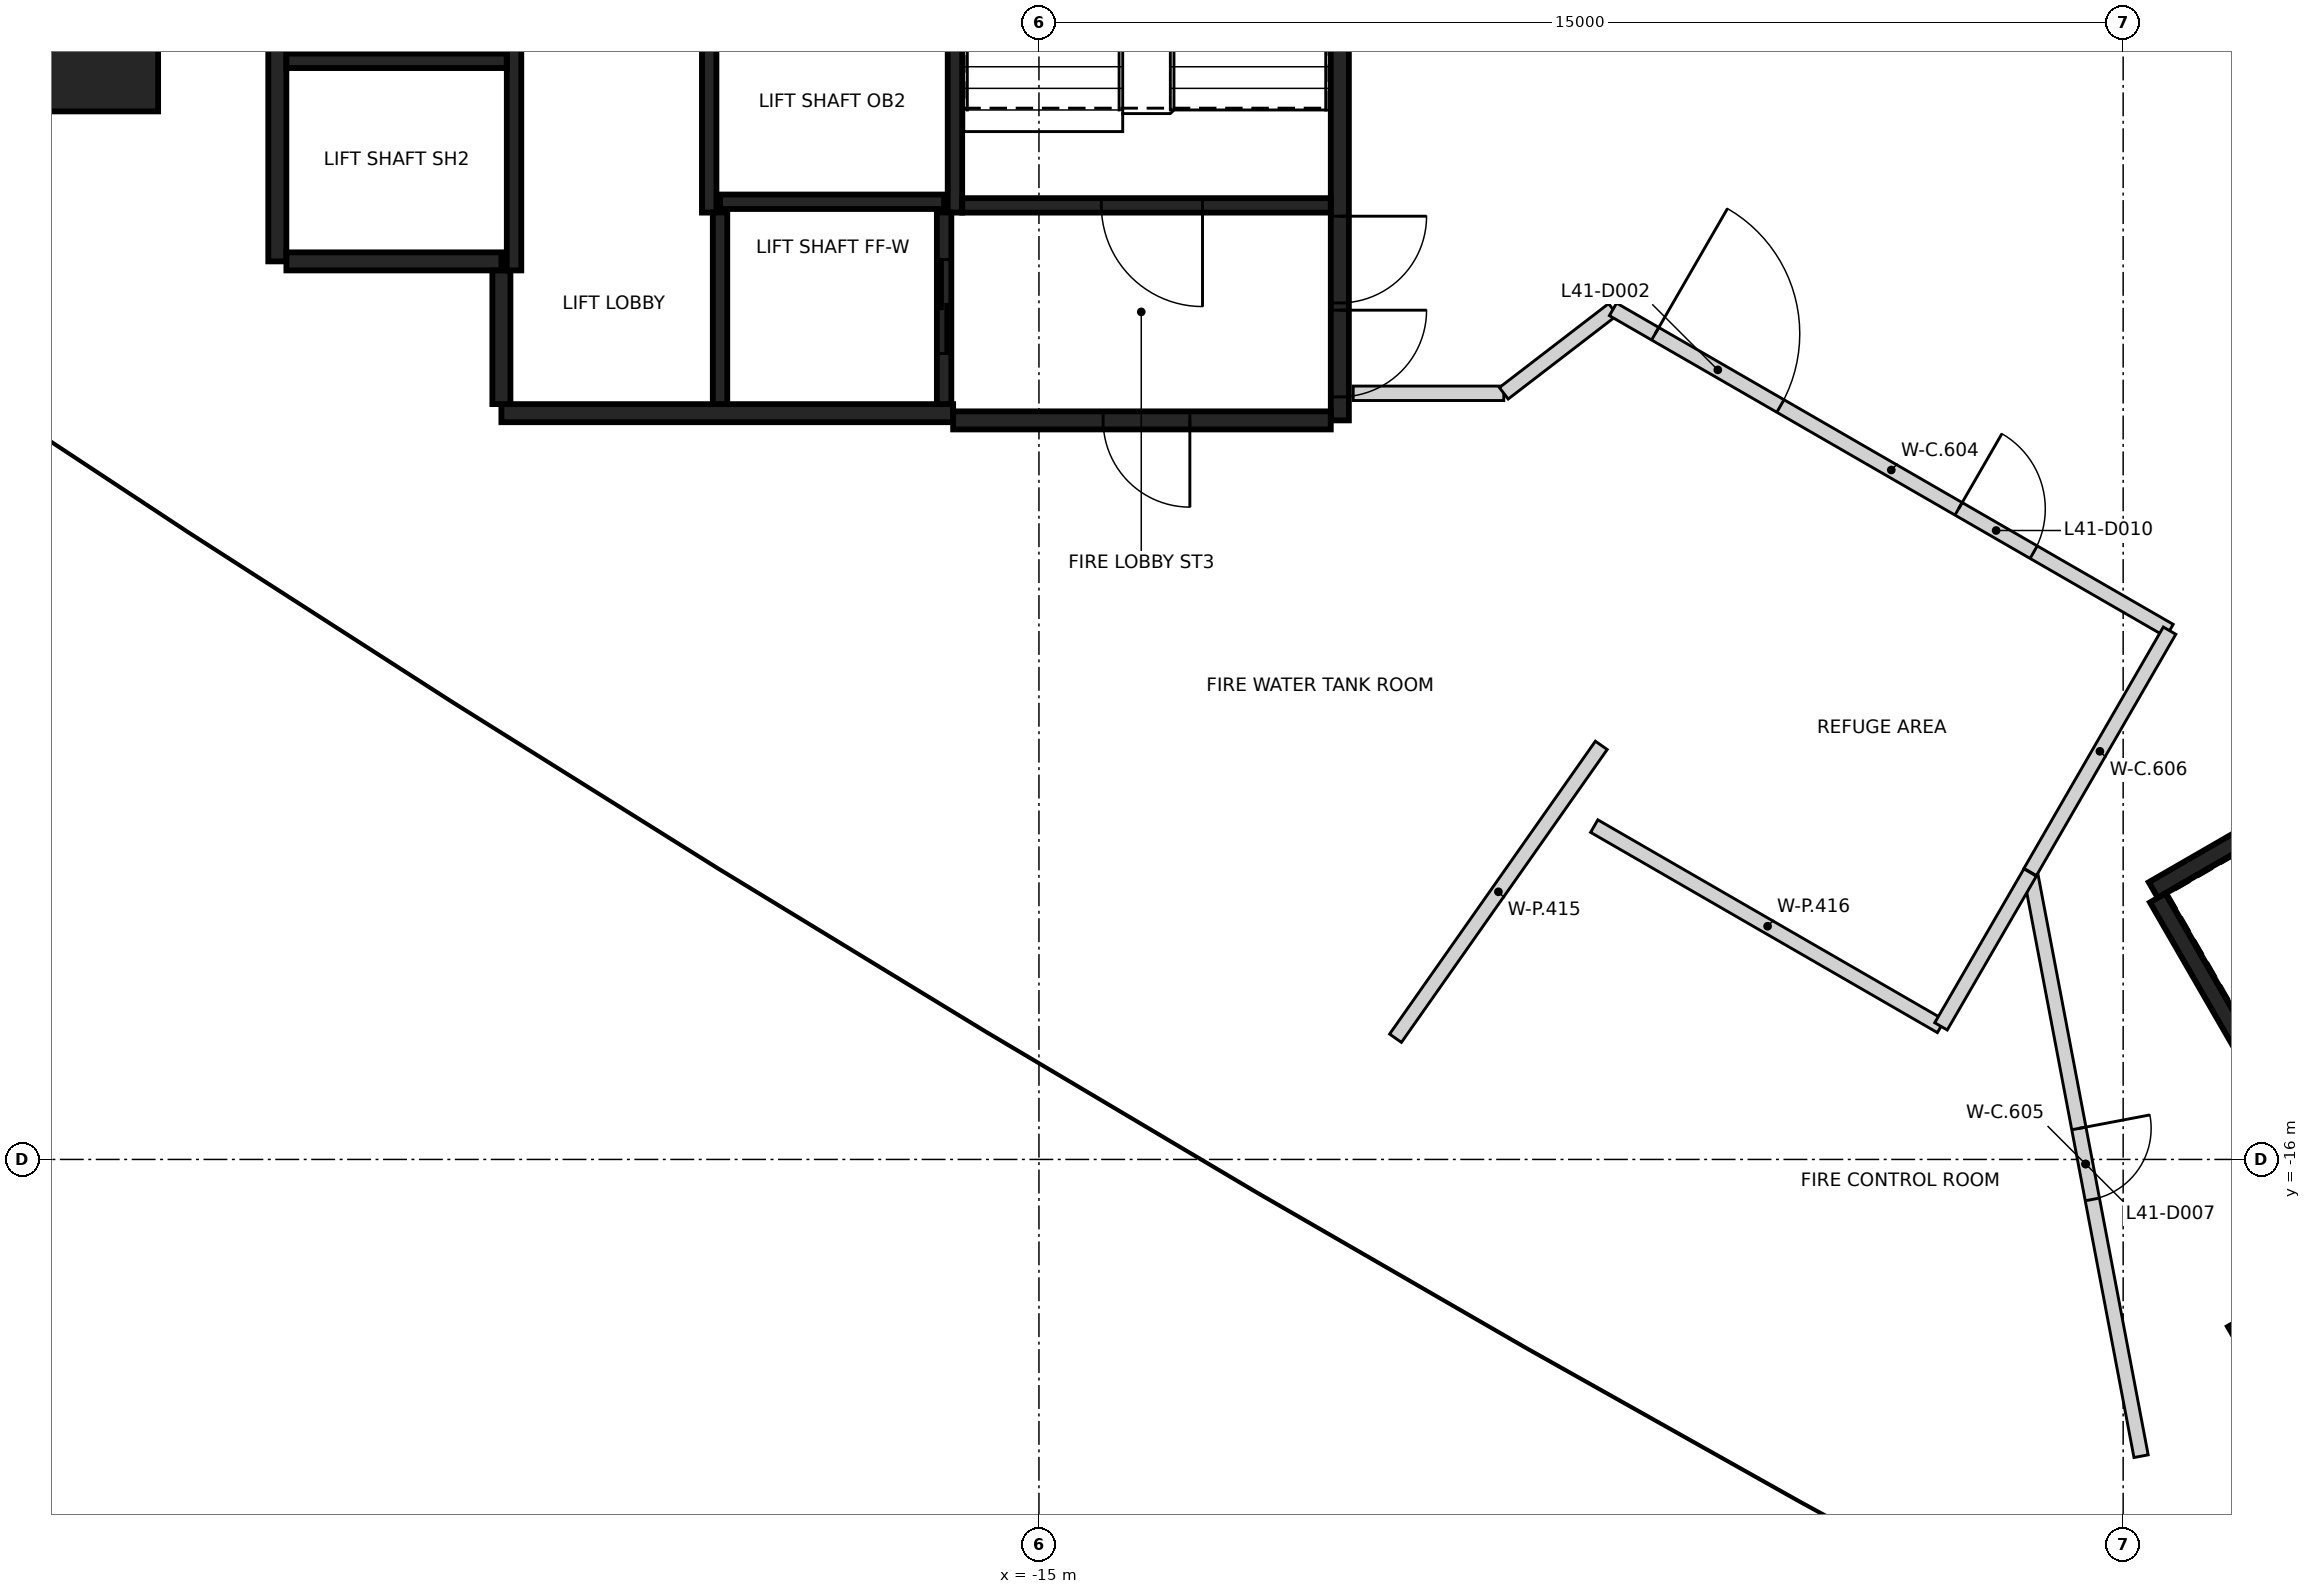
"""IFC4 building model, lengths in metres.
Left out: names, types, materials, properties, quantities, classifications, styles, units other than length and angle.
Written with IfcOpenShell. Run it as: python <this file> out.ifc"""

import sys

from ifc_helpers import new_model, si_unit, direction, frame, frame_2d, origin, origin_2d, place, context, subcontext, project, spatial, rectangle, extrude, element, fill, save


model = new_model("IFC4")
c1 = context("Model", 3, precision=1e-05, world=origin(), true_north=direction((0.0, 1.0)))
c2 = subcontext(c1, "Body", "Model", "MODEL_VIEW")
j1 = project(units=[si_unit("LENGTHUNIT", "METRE"), si_unit("PLANEANGLEUNIT", "RADIAN")], contexts=[c1])
p1 = place(None, origin())
s1 = spatial("IfcSite", under=j1, at=p1, CompositionType="ELEMENT")
p2 = place(p1, origin())
s2 = spatial("IfcBuilding", under=s1, at=p2, CompositionType="ELEMENT")
p3 = place(p2, frame((0.0, 0.0, 164.8)))
s3 = spatial("IfcBuildingStorey", under=s2, at=p3, CompositionType="ELEMENT", Elevation=164.8)
p4 = place(p3, frame((-28.987, 0.0, -0.4), z_axis=(0.0, 0.0, 1.0), x_axis=(1.0, 0.0, 0.0)))
e1 = element("IfcColumn", 1, at=p4, inside=s3, PredefinedType="COLUMN", context=c2, shape_type="SweptSolid", body=[
    extrude(rectangle(XDim=3.6, YDim=3.0, at=origin_2d()), origin(), (0.0, 0.0, 1.0), 4.85),
])
p5 = place(p3, frame((-10.837, 5.775, 0.0), z_axis=(0.0, 0.0, 1.0), x_axis=(0.0, -1.0, 0.0)))
e2 = element("IfcWall", 2, at=p5, inside=s3, PredefinedType="SHEAR", context=c2, shape_type="SweptSolid", body=[
    extrude(rectangle(XDim=11.55, YDim=0.25, at=frame_2d((5.775, 0.0))), origin(), (0.0, 0.0, 1.0), 4.45),
])
p6 = place(p5, frame((10.025, 0.0, 0.0)))
e3 = element("IfcOpeningElement", 3, at=p6, cuts=e2, PredefinedType="OPENING", context=c2, shape_type="SweptSolid", body=[
    extrude(rectangle(XDim=1.2, YDim=2.1, at=frame_2d((0.6, 1.05))), frame((0.0, 0.135, 0.0), z_axis=(0.0, -1.0, 0.0), x_axis=(1.0, 0.0, 0.0)), (0.0, 0.0, 1.0), 0.27),
])
p7 = place(p5, frame((8.725, 0.0, 0.0)))
e4 = element("IfcOpeningElement", 4, at=p7, cuts=e2, PredefinedType="OPENING", context=c2, shape_type="SweptSolid", body=[
    extrude(rectangle(XDim=1.2, YDim=2.1, at=frame_2d((0.6, 1.05))), frame((0.0, 0.135, 0.0), z_axis=(0.0, -1.0, 0.0), x_axis=(1.0, 0.0, 0.0)), (0.0, 0.0, 1.0), 0.27),
])
p8 = place(p3, frame((-16.187, -5.675, 0.0), z_axis=(0.0, 0.0, 1.0), x_axis=(-1.0, 0.0, 0.0)))
e5 = element("IfcWall", 5, at=p8, inside=s3, PredefinedType="SHEAR", context=c2, shape_type="SweptSolid", body=[
    extrude(rectangle(XDim=6.25, YDim=0.25, at=frame_2d((3.125, 0.0))), origin(), (0.0, 0.0, 1.0), 4.45),
])
p9 = place(p3, frame((-25.537, -3.575, 0.0), z_axis=(0.0, 0.0, 1.0), x_axis=(0.0, 1.0, 0.0)))
e6 = element("IfcWall", 6, at=p9, inside=s3, PredefinedType="SHEAR", context=c2, shape_type="SweptSolid", body=[
    extrude(rectangle(XDim=5.85, YDim=0.25, at=frame_2d((2.925, 0.0))), origin(), (0.0, 0.0, 1.0), 4.45),
])
p10 = place(p3, frame((-10.963, -5.775, 0.0), z_axis=(0.0, 0.0, 1.0), x_axis=(-1.0, 0.0, 0.0)))
e7 = element("IfcWall", 7, at=p10, inside=s3, PredefinedType="SHEAR", context=c2, shape_type="SweptSolid", body=[
    extrude(rectangle(XDim=5.225, YDim=0.25, at=frame_2d((2.612, 0.0))), origin(), (0.0, 0.0, 1.0), 4.45),
])
p11 = place(p10, frame((1.95, 0.0, 0.0)))
e8 = element("IfcOpeningElement", 8, at=p11, cuts=e7, PredefinedType="OPENING", context=c2, shape_type="SweptSolid", body=[
    extrude(rectangle(XDim=1.2, YDim=2.1, at=frame_2d((0.6, 1.05))), frame((0.0, 0.135, 0.0), z_axis=(0.0, -1.0, 0.0), x_axis=(1.0, 0.0, 0.0)), (0.0, 0.0, 1.0), 0.27),
])
p12 = place(p3, frame((-22.437, -3.575, 0.0), z_axis=(0.0, 0.0, 1.0), x_axis=(-1.0, 0.0, 0.0)))
e9 = element("IfcWall", 9, at=p12, inside=s3, PredefinedType="SHEAR", context=c2, shape_type="SweptSolid", body=[
    extrude(rectangle(XDim=2.975, YDim=0.25, at=frame_2d((1.487, 0.0))), origin(), (0.0, 0.0, 1.0), 4.45),
])
p13 = place(p3, frame((-22.437, -5.55, 0.0), z_axis=(0.0, 0.0, 1.0), x_axis=(0.0, 1.0, 0.0)))
e10 = element("IfcWall", 10, at=p13, inside=s3, PredefinedType="SHEAR", context=c2, shape_type="SweptSolid", body=[
    extrude(rectangle(XDim=1.849, YDim=0.25, at=frame_2d((0.925, 0.0))), origin(), (0.0, 0.0, 1.0), 4.45),
])
p14 = place(p3, frame((-16.162, 2.951, 0.0), z_axis=(0.0, 0.0, 1.0), x_axis=(0.0, -1.0, 0.0)))
e11 = element("IfcWall", 11, at=p14, inside=s3, PredefinedType="SHEAR", context=c2, shape_type="SweptSolid", body=[
    extrude(rectangle(XDim=5.851, YDim=0.2, at=frame_2d((2.925, 0.0))), origin(), (0.0, 0.0, 1.0), 4.45),
])
for number, where, z_axis, x_axis in (
    (12, (-19.562, -2.9, 0.0), (0.0, 0.0, 1.0), (0.0, 1.0, 0.0)),
    (13, (-22.262, 2.4, 0.0), (0.0, 0.0, 1.0), (0.0, -1.0, 0.0)),
):
    element("IfcWall", number, at=place(p3, frame(where, z_axis=z_axis, x_axis=x_axis)), inside=s3, PredefinedType="SHEAR", context=c2, shape_type="SweptSolid", body=[
        extrude(rectangle(XDim=6.1, YDim=0.2, at=frame_2d((3.05, 0.0))), origin(), (0.0, 0.0, 1.0), 4.45),
    ])
p15 = place(p3, frame((-10.963, -2.8, 0.0), z_axis=(0.0, 0.0, 1.0), x_axis=(-1.0, 0.0, 0.0)))
e14 = element("IfcWall", 14, at=p15, inside=s3, PredefinedType="SHEAR", context=c2, shape_type="SweptSolid", body=[
    extrude(rectangle(XDim=5.098, YDim=0.2, at=frame_2d((2.549, 0.0))), origin(), (0.0, 0.0, 1.0), 4.45),
])
p16 = place(p15, frame((1.774, 0.0, 0.0)))
e15 = element("IfcOpeningElement", 15, at=p16, cuts=e14, PredefinedType="OPENING", context=c2, shape_type="SweptSolid", body=[
    extrude(rectangle(XDim=1.4, YDim=2.1, at=frame_2d((0.7, 1.05))), frame((0.0, 0.11, 0.0), z_axis=(0.0, -1.0, 0.0), x_axis=(1.0, 0.0, 0.0)), (0.0, 0.0, 1.0), 0.22),
])
p17 = place(p3, frame((-22.363, -0.8, 0.0), z_axis=(0.0, 0.0, 1.0), x_axis=(-1.0, 0.0, 0.0)))
e16 = element("IfcWall", 16, at=p17, inside=s3, PredefinedType="SHEAR", context=c2, shape_type="SweptSolid", body=[
    extrude(rectangle(XDim=3.048, YDim=0.2, at=frame_2d((1.524, 0.0))), origin(), (0.0, 0.0, 1.0), 4.45),
])
p18 = place(p3, frame((-19.412, -2.75, 0.0), z_axis=(0.0, 0.0, 1.0), x_axis=(1.0, 0.0, 0.0)))
e17 = element("IfcWall", 17, at=p18, inside=s3, PredefinedType="SHEAR", context=c2, shape_type="SweptSolid", body=[
    extrude(rectangle(XDim=3.1, YDim=0.2, at=frame_2d((1.55, 0.0))), origin(), (0.0, 0.0, 1.0), 4.45),
])
p19 = place(p3, frame((-16.312, -2.898, 0.0), z_axis=(0.0, 0.0, 1.0), x_axis=(0.0, -1.0, 0.0)))
e18 = element("IfcWall", 18, at=p19, inside=s3, PredefinedType="SHEAR", context=c2, shape_type="SweptSolid", body=[
    extrude(rectangle(XDim=2.651, YDim=0.2, at=frame_2d((1.325, 0.0))), origin(), (0.0, 0.0, 1.0), 4.45),
])
p20 = place(p19, frame((0.652, 0.0, 0.0)))
e19 = element("IfcOpeningElement", 19, at=p20, cuts=e18, PredefinedType="OPENING", context=c2, shape_type="SweptSolid", body=[
    extrude(rectangle(XDim=1.3, YDim=2.1, at=frame_2d((0.65, 1.05))), frame((0.0, 0.11, 0.0), z_axis=(0.0, -1.0, 0.0), x_axis=(1.0, 0.0, 0.0)), (0.0, 0.0, 1.0), 0.22),
])
p21 = place(p3, frame((-19.412, -5.549, 0.0), z_axis=(0.0, 0.0, 1.0), x_axis=(0.0, 1.0, 0.0)))
e20 = element("IfcWall", 20, at=p21, inside=s3, PredefinedType="SHEAR", context=c2, shape_type="SweptSolid", body=[
    extrude(rectangle(XDim=2.651, YDim=0.2, at=frame_2d((1.325, 0.0))), origin(), (0.0, 0.0, 1.0), 4.45),
])
p22 = place(p3, frame((0.417, -12.273, 0.0), z_axis=(0.0, 0.0, 1.0), x_axis=(0.866021906294, 0.500006057782, 0.0)))
e21 = element("IfcWall", 21, at=p22, inside=s3, PredefinedType="SHEAR", context=c2, shape_type="SweptSolid", body=[
    extrude(rectangle(XDim=11.55, YDim=0.25, at=frame_2d((5.775, 0.0))), origin(), (0.0, 0.0, 1.0), 4.45),
])
p23 = place(p22, frame((10.025, 0.0, 0.0)))
e22 = element("IfcOpeningElement", 22, at=p23, cuts=e21, PredefinedType="OPENING", context=c2, shape_type="SweptSolid", body=[
    extrude(rectangle(XDim=1.2, YDim=2.1, at=frame_2d((0.6, 1.05))), frame((0.0, 0.135, 0.0), z_axis=(0.0, -1.0, 0.0), x_axis=(1.0, 0.0, 0.0)), (0.0, 0.0, 1.0), 0.27),
])
p24 = place(p22, frame((8.725, 0.0, 0.0)))
e23 = element("IfcOpeningElement", 23, at=p24, cuts=e21, PredefinedType="OPENING", context=c2, shape_type="SweptSolid", body=[
    extrude(rectangle(XDim=1.2, YDim=2.1, at=frame_2d((0.6, 1.05))), frame((0.0, 0.135, 0.0), z_axis=(0.0, -1.0, 0.0), x_axis=(1.0, 0.0, 0.0)), (0.0, 0.0, 1.0), 0.27),
])
p25 = place(p3, frame((3.235, -17.153, 0.0), z_axis=(0.0, 0.0, 1.0), x_axis=(-0.500008851346, 0.866020293397, 0.0)))
e24 = element("IfcWall", 24, at=p25, inside=s3, PredefinedType="SHEAR", context=c2, shape_type="SweptSolid", body=[
    extrude(rectangle(XDim=5.51, YDim=0.25, at=frame_2d((2.755, 0.0))), origin(), (0.0, 0.0, 1.0), 4.45),
])
p26 = place(p3, frame((3.085, -20.894, 0.0), z_axis=(0.0, 0.0, 1.0), x_axis=(-0.499978833458, 0.866037623948, 0.0)))
e25 = element("IfcWall", 25, at=p26, inside=s3, PredefinedType="SHEAR", context=c2, shape_type="SweptSolid", body=[
    extrude(rectangle(XDim=3.05, YDim=0.25, at=frame_2d((1.525, 0.0))), origin(), (0.0, 0.0, 1.0), 4.45),
])
p27 = place(p3, frame((-10.652, -5.4, 0.0), z_axis=(0.0, 0.0, 1.0), x_axis=(1.0, 0.0, 0.0)))
e26 = element("IfcWall", 26, at=p27, inside=s3, PredefinedType="PARTITIONING", context=c2, shape_type="SweptSolid", body=[
    extrude(rectangle(XDim=2.083, YDim=0.2, at=frame_2d((1.042, 0.0))), origin(), (0.0, 0.0, 1.0), 4.45),
])
p28 = place(p3, frame((-8.569, -5.4, 0.0), z_axis=(0.0, 0.0, 1.0), x_axis=(0.792981085858, 0.609246253555, 0.0)))
e27 = element("IfcWall", 27, at=p28, inside=s3, PredefinedType="PARTITIONING", context=c2, shape_type="SweptSolid", body=[
    extrude(rectangle(XDim=1.906, YDim=0.2, at=frame_2d((0.953, 0.0))), origin(), (0.0, 0.0, 1.0), 4.45),
])
p29 = place(p3, frame((-7.058, -4.239, 0.0), z_axis=(0.0, 0.0, 1.0), x_axis=(0.86609917177, -0.499872208329, 0.0)))
e28 = element("IfcWall", 28, at=p29, inside=s3, PredefinedType="PARTITIONING", context=c2, shape_type="SweptSolid", body=[
    extrude(rectangle(XDim=8.891, YDim=0.2, at=frame_2d((4.445, 0.0))), origin(), (0.0, 0.0, 1.0), 4.45),
])
p30 = place(p29, frame((0.674, 0.0, 0.0)))
e29 = element("IfcOpeningElement", 29, at=p30, cuts=e28, PredefinedType="OPENING", context=c2, shape_type="SweptSolid", body=[
    extrude(rectangle(XDim=2.0, YDim=2.1, at=frame_2d((1.0, 1.05))), frame((0.0, 0.11, 0.0), z_axis=(0.0, -1.0, 0.0), x_axis=(1.0, 0.0, 0.0)), (0.0, 0.0, 1.0), 0.22),
])
p31 = place(p29, frame((5.52, 0.0, 0.0)))
e30 = element("IfcOpeningElement", 30, at=p31, cuts=e28, PredefinedType="OPENING", context=c2, shape_type="SweptSolid", body=[
    extrude(rectangle(XDim=1.2, YDim=2.1, at=frame_2d((0.6, 1.05))), frame((0.0, 0.11, 0.0), z_axis=(0.0, -1.0, 0.0), x_axis=(1.0, 0.0, 0.0)), (0.0, 0.0, 1.0), 0.22),
])
p32 = place(p3, frame((-1.286, -12.023, 0.0), z_axis=(0.0, 0.0, 1.0), x_axis=(0.186445263773, -0.98246534983, 0.0)))
e31 = element("IfcWall", 31, at=p32, inside=s3, PredefinedType="PARTITIONING", context=c2, shape_type="SweptSolid", body=[
    extrude(rectangle(XDim=8.227, YDim=0.2, at=frame_2d((4.114, 0.0))), origin(), (0.0, 0.0, 1.0), 4.45),
])
p33 = place(p32, frame((3.611, 0.0, 0.0)))
e32 = element("IfcOpeningElement", 32, at=p33, cuts=e31, PredefinedType="OPENING", context=c2, shape_type="SweptSolid", body=[
    extrude(rectangle(XDim=1.0, YDim=2.1, at=frame_2d((0.5, 1.05))), frame((0.0, 0.11, 0.0), z_axis=(0.0, -1.0, 0.0), x_axis=(1.0, 0.0, 0.0)), (0.0, 0.0, 1.0), 0.22),
])
p34 = place(p3, frame((-1.286, -12.023, 0.0), z_axis=(0.0, 0.0, 1.0), x_axis=(0.50005498091, 0.865993658214, 0.0)))
e33 = element("IfcWall", 33, at=p34, inside=s3, PredefinedType="PARTITIONING", context=c2, shape_type="SweptSolid", body=[
    extrude(rectangle(XDim=3.855, YDim=0.2, at=frame_2d((1.928, 0.0))), origin(), (0.0, 0.0, 1.0), 4.45),
])
p35 = place(p3, frame((-10.067, -14.323, 0.0), z_axis=(0.0, 0.0, 1.0), x_axis=(0.574887536517, 0.818232436632, 0.0)))
e34 = element("IfcWall", 34, at=p35, inside=s3, PredefinedType="PARTITIONING", context=c2, shape_type="SweptSolid", body=[
    extrude(rectangle(XDim=4.952, YDim=0.2, at=frame_2d((2.476, 0.0))), origin(), (0.0, 0.0, 1.0), 4.45),
])
p36 = place(p3, frame((-7.318, -11.388, 0.0), z_axis=(0.0, 0.0, 1.0), x_axis=(0.865961763079, -0.500110212738, 0.0)))
e35 = element("IfcWall", 35, at=p36, inside=s3, PredefinedType="PARTITIONING", context=c2, shape_type="SweptSolid", body=[
    extrude(rectangle(XDim=5.541, YDim=0.2, at=frame_2d((2.771, 0.0))), origin(), (0.0, 0.0, 1.0), 4.45),
])
p37 = place(p3, frame((-2.52, -14.159, 0.0), z_axis=(0.0, 0.0, 1.0), x_axis=(0.501153622479, 0.865358334261, 0.0)))
e36 = element("IfcWall", 36, at=p37, inside=s3, PredefinedType="PARTITIONING", context=c2, shape_type="SweptSolid", body=[
    extrude(rectangle(XDim=2.46, YDim=0.2, at=frame_2d((1.23, 0.0))), origin(), (0.0, 0.0, 1.0), 4.45),
])
p38 = place(p3, frame((0.0, 0.0, -0.4)))
p39 = place(p38, origin())
p40 = place(p39, frame((0.0, 0.0, 0.35)))
e37 = element("IfcWindow", 37, at=p40, inside=s3, PartitioningType="SINGLE_PANEL", PredefinedType="SKYLIGHT", context=c2, shape_type="SweptSolid", body=[
    extrude(rectangle(XDim=8.34, YDim=5.2, at=origin_2d()), origin(), (0.0, 0.0, 1.0), 0.05),
])
p41 = place(p20, origin())
e38 = element("IfcDoor", 38, at=p41, inside=s3, OperationType="SLIDING_TO_RIGHT", PredefinedType="DOOR", context=c2, shape_type="SweptSolid", body=[
    extrude(rectangle(XDim=1.3, YDim=2.1, at=frame_2d((0.65, 1.05))), frame((0.0, 0.025, 0.0), z_axis=(0.0, -1.0, 0.0), x_axis=(1.0, 0.0, 0.0)), (0.0, 0.0, 1.0), 0.05),
])
fill(e19, e38)
p42 = place(p6, origin())
e39 = element("IfcDoor", 39, at=p42, inside=s3, OperationType="SINGLE_SWING_LEFT", PredefinedType="DOOR", context=c2, shape_type="SweptSolid", body=[
    extrude(rectangle(XDim=1.2, YDim=2.1, at=frame_2d((0.6, 1.05))), frame((0.0, 0.025, 0.0), z_axis=(0.0, -1.0, 0.0), x_axis=(1.0, 0.0, 0.0)), (0.0, 0.0, 1.0), 0.05),
])
fill(e3, e39)
p43 = place(p7, origin())
e40 = element("IfcDoor", 40, at=p43, inside=s3, OperationType="SINGLE_SWING_RIGHT", PredefinedType="DOOR", context=c2, shape_type="SweptSolid", body=[
    extrude(rectangle(XDim=1.2, YDim=2.1, at=frame_2d((0.6, 1.05))), frame((0.0, 0.025, 0.0), z_axis=(0.0, -1.0, 0.0), x_axis=(1.0, 0.0, 0.0)), (0.0, 0.0, 1.0), 0.05),
])
fill(e4, e40)
p44 = place(p16, origin())
e41 = element("IfcDoor", 41, at=p44, inside=s3, OperationType="SINGLE_SWING_RIGHT", PredefinedType="DOOR", context=c2, shape_type="SweptSolid", body=[
    extrude(rectangle(XDim=1.4, YDim=2.1, at=frame_2d((0.7, 1.05))), frame((0.0, 0.025, 0.0), z_axis=(0.0, -1.0, 0.0), x_axis=(1.0, 0.0, 0.0)), (0.0, 0.0, 1.0), 0.05),
])
fill(e15, e41)
p45 = place(p11, origin())
e42 = element("IfcDoor", 42, at=p45, inside=s3, OperationType="SINGLE_SWING_LEFT", PredefinedType="DOOR", context=c2, shape_type="SweptSolid", body=[
    extrude(rectangle(XDim=1.2, YDim=2.1, at=frame_2d((0.6, 1.05))), frame((0.0, 0.025, 0.0), z_axis=(0.0, -1.0, 0.0), x_axis=(1.0, 0.0, 0.0)), (0.0, 0.0, 1.0), 0.05),
])
fill(e8, e42)
p46 = place(p30, frame((2.0, 0.0, 0.0), z_axis=(0.0, 0.0, 1.0), x_axis=(-1.0, 0.0, 0.0)))
e43 = element("IfcDoor", 43, at=p46, inside=s3, OperationType="DOUBLE_DOOR_SINGLE_SWING", PredefinedType="DOOR", context=c2, shape_type="SweptSolid", body=[
    extrude(rectangle(XDim=2.0, YDim=2.1, at=frame_2d((1.0, 1.05))), frame((0.0, 0.025, 0.0), z_axis=(0.0, -1.0, 0.0), x_axis=(1.0, 0.0, 0.0)), (0.0, 0.0, 1.0), 0.05),
])
fill(e29, e43)
p47 = place(p33, frame((1.0, 0.0, 0.0), z_axis=(0.0, 0.0, 1.0), x_axis=(-1.0, 0.0, 0.0)))
e44 = element("IfcDoor", 44, at=p47, inside=s3, OperationType="SINGLE_SWING_LEFT", PredefinedType="DOOR", context=c2, shape_type="SweptSolid", body=[
    extrude(rectangle(XDim=1.0, YDim=2.1, at=frame_2d((0.5, 1.05))), frame((0.0, 0.025, 0.0), z_axis=(0.0, -1.0, 0.0), x_axis=(1.0, 0.0, 0.0)), (0.0, 0.0, 1.0), 0.05),
])
fill(e32, e44)
p48 = place(p31, frame((1.2, 0.0, 0.0), z_axis=(0.0, 0.0, 1.0), x_axis=(-1.0, 0.0, 0.0)))
e45 = element("IfcDoor", 45, at=p48, inside=s3, OperationType="SINGLE_SWING_LEFT", PredefinedType="DOOR", context=c2, shape_type="SweptSolid", body=[
    extrude(rectangle(XDim=1.2, YDim=2.1, at=frame_2d((0.6, 1.05))), frame((0.0, 0.025, 0.0), z_axis=(0.0, -1.0, 0.0), x_axis=(1.0, 0.0, 0.0)), (0.0, 0.0, 1.0), 0.05),
])
fill(e30, e45)
save(model, sys.argv[1])
